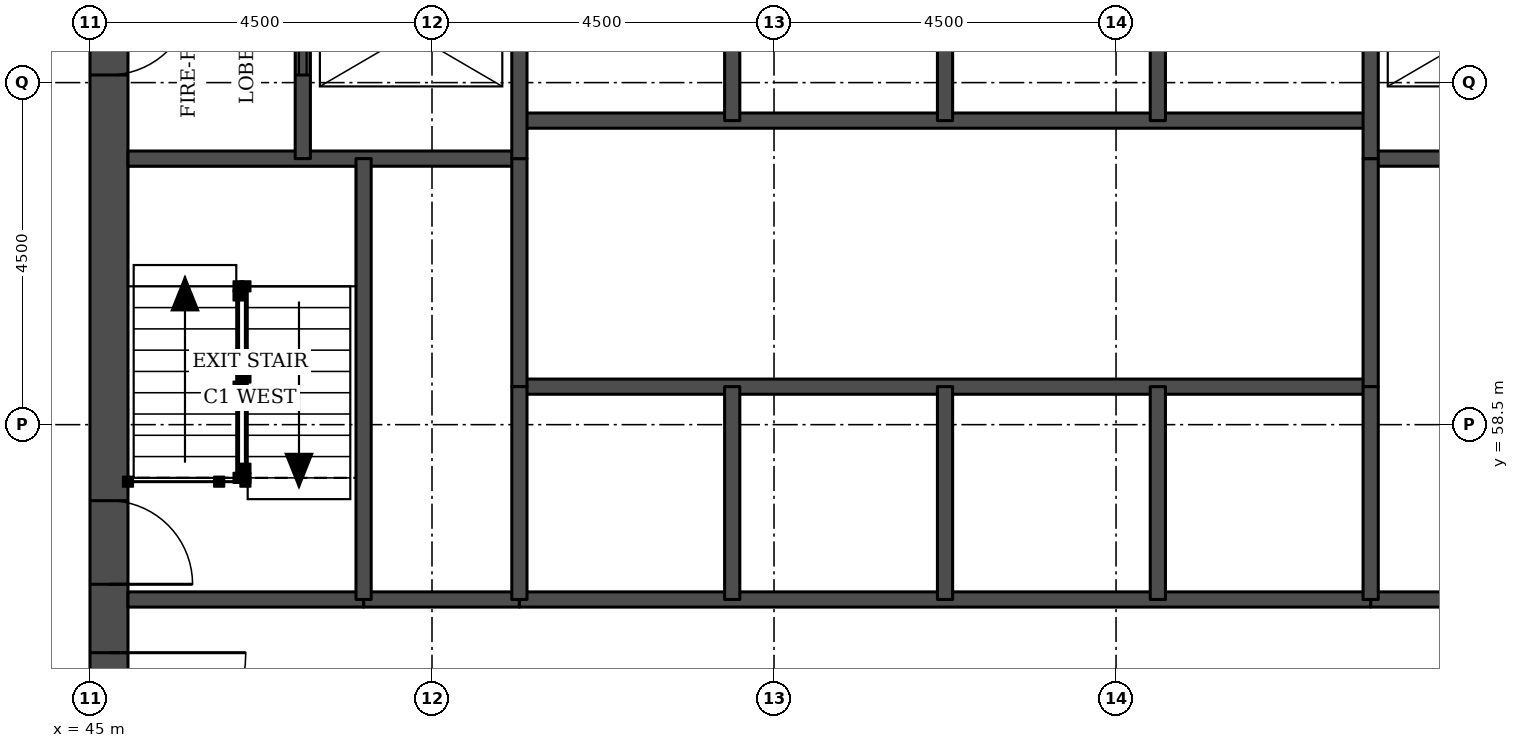
"""IFC4 building model, lengths in metres.
Left out: names, types, materials, properties, quantities, classifications, styles, units other than length and angle.
Written with IfcOpenShell. Run it as: python <this file> out.ifc"""

import sys

from ifc_helpers import new_model, si_unit, direction, frame, frame_2d, origin, place, context, subcontext, project, spatial, rectangle, extrude, element, fill, save


model = new_model("IFC4")
c1 = context("Model", 3, precision=1e-05, world=origin(), true_north=direction((0.0, 1.0)))
c2 = subcontext(c1, "Body", "Model", "MODEL_VIEW")
j1 = project(units=[si_unit("LENGTHUNIT", "METRE"), si_unit("PLANEANGLEUNIT", "RADIAN")], contexts=[c1])
p1 = place(None, origin())
s1 = spatial("IfcSite", under=j1, at=p1, CompositionType="ELEMENT")
p2 = place(p1, origin())
s2 = spatial("IfcBuilding", under=s1, at=p2, CompositionType="ELEMENT")
p3 = place(p2, frame((0.0, 0.0, 39.6)))
s3 = spatial("IfcBuildingStorey", under=s2, at=p3, CompositionType="ELEMENT", Elevation=39.6)
p4 = place(p3, frame((45.25, 49.5, 0.0), z_axis=(0.0, 0.0, 1.0), x_axis=(0.0, 1.0, 0.0)))
e1 = element("IfcWall", 1, at=p4, inside=s3, PredefinedType="SHEAR", context=c2, shape_type="SweptSolid", body=[
    extrude(rectangle(XDim=22.5, YDim=0.5, at=frame_2d((11.25, 0.0))), origin(), (0.0, 0.0, 1.0), 3.3),
])
p5 = place(p4, frame((4.2, 0.0, 0.0)))
e2 = element("IfcOpeningElement", 2, at=p5, cuts=e1, PredefinedType="OPENING", context=c2, shape_type="SweptSolid", body=[
    extrude(rectangle(XDim=1.8, YDim=2.1, at=frame_2d((0.9, 1.05))), frame((0.0, 0.26, 0.0), z_axis=(0.0, -1.0, 0.0), x_axis=(1.0, 0.0, 0.0)), (0.0, 0.0, 1.0), 0.52),
])
p6 = place(p4, frame((6.9, 0.0, 0.0)))
e3 = element("IfcOpeningElement", 3, at=p6, cuts=e1, PredefinedType="OPENING", context=c2, shape_type="SweptSolid", body=[
    extrude(rectangle(XDim=1.1, YDim=2.1, at=frame_2d((0.55, 1.05))), frame((0.0, 0.26, 0.0), z_axis=(0.0, -1.0, 0.0), x_axis=(1.0, 0.0, 0.0)), (0.0, 0.0, 1.0), 0.52),
])
p7 = place(p4, frame((13.6, 0.0, 0.0)))
e4 = element("IfcOpeningElement", 4, at=p7, cuts=e1, PredefinedType="OPENING", context=c2, shape_type="SweptSolid", body=[
    extrude(rectangle(XDim=1.1, YDim=2.1, at=frame_2d((0.55, 1.05))), frame((0.0, 0.26, 0.0), z_axis=(0.0, -1.0, 0.0), x_axis=(1.0, 0.0, 0.0)), (0.0, 0.0, 1.0), 0.52),
])
p8 = place(p4, frame((16.5, 0.0, 0.0)))
e5 = element("IfcOpeningElement", 5, at=p8, cuts=e1, PredefinedType="OPENING", context=c2, shape_type="SweptSolid", body=[
    extrude(rectangle(XDim=1.8, YDim=2.1, at=frame_2d((0.9, 1.05))), frame((0.0, 0.26, 0.0), z_axis=(0.0, -1.0, 0.0), x_axis=(1.0, 0.0, 0.0)), (0.0, 0.0, 1.0), 0.52),
])
for number, where, z_axis, x_axis in (
    (6, (48.6, 56.2, 0.0), (0.0, 0.0, 1.0), (1.0, 0.0, 0.0)),
    (7, (61.85, 56.2, 0.0), (0.0, 0.0, 1.0), (1.0, 0.0, 0.0)),
):
    element("IfcWall", number, at=place(p3, frame(where, z_axis=z_axis, x_axis=x_axis)), inside=s3, PredefinedType="SOLIDWALL", context=c2, shape_type="SweptSolid", body=[
        extrude(rectangle(XDim=2.05, YDim=0.2, at=frame_2d((1.025, 0.0))), origin(), (0.0, 0.0, 1.0), 3.08),
    ])
p9 = place(p3, frame((45.5, 56.2, 0.0), z_axis=(0.0, 0.0, 1.0), x_axis=(1.0, 0.0, 0.0)))
e8 = element("IfcWall", 8, at=p9, inside=s3, PredefinedType="SOLIDWALL", context=c2, shape_type="SweptSolid", body=[
    extrude(rectangle(XDim=3.1, YDim=0.2, at=frame_2d((1.55, 0.0))), origin(), (0.0, 0.0, 1.0), 3.08),
])
p10 = place(p3, frame((50.65, 56.2, 0.0), z_axis=(0.0, 0.0, 1.0), x_axis=(1.0, 0.0, 0.0)))
e9 = element("IfcWall", 9, at=p10, inside=s3, PredefinedType="SOLIDWALL", context=c2, shape_type="SweptSolid", body=[
    extrude(rectangle(XDim=11.2, YDim=0.2, at=frame_2d((5.6, 0.0))), origin(), (0.0, 0.0, 1.0), 3.08),
])
p11 = place(p3, frame((50.65, 59.0, 0.0), z_axis=(0.0, 0.0, 1.0), x_axis=(1.0, 0.0, 0.0)))
e10 = element("IfcWall", 10, at=p11, inside=s3, PredefinedType="SOLIDWALL", context=c2, shape_type="SweptSolid", body=[
    extrude(rectangle(XDim=11.2, YDim=0.2, at=frame_2d((5.6, 0.0))), origin(), (0.0, 0.0, 1.0), 3.3),
])
for number, where, z_axis, x_axis in (
    (11, (45.5, 62.0, 0.0), (0.0, 0.0, 1.0), (1.0, 0.0, 0.0)),
    (12, (61.85, 62.0, 0.0), (0.0, 0.0, 1.0), (1.0, 0.0, 0.0)),
):
    element("IfcWall", number, at=place(p3, frame(where, z_axis=z_axis, x_axis=x_axis)), inside=s3, PredefinedType="SOLIDWALL", context=c2, shape_type="SweptSolid", body=[
        extrude(rectangle(XDim=5.15, YDim=0.2, at=frame_2d((2.575, 0.0))), origin(), (0.0, 0.0, 1.0), 3.08),
    ])
p12 = place(p3, frame((50.65, 62.5, 0.0), z_axis=(0.0, 0.0, 1.0), x_axis=(1.0, 0.0, 0.0)))
e13 = element("IfcWall", 13, at=p12, inside=s3, PredefinedType="SOLIDWALL", context=c2, shape_type="SweptSolid", body=[
    extrude(rectangle(XDim=11.2, YDim=0.2, at=frame_2d((5.6, 0.0))), origin(), (0.0, 0.0, 1.0), 3.3),
])
p13 = place(p3, frame((47.8, 62.0, 0.0), z_axis=(0.0, 0.0, 1.0), x_axis=(0.0, 1.0, 0.0)))
e14 = element("IfcWall", 14, at=p13, inside=s3, PredefinedType="SOLIDWALL", context=c2, shape_type="SweptSolid", body=[
    extrude(rectangle(XDim=3.3, YDim=0.2, at=frame_2d((1.65, 0.0))), origin(), (0.0, 0.0, 1.0), 3.08),
])
p14 = place(p13, frame((1.1, 0.0, 0.0)))
e15 = element("IfcOpeningElement", 15, at=p14, cuts=e14, PredefinedType="OPENING", context=c2, shape_type="SweptSolid", body=[
    extrude(rectangle(XDim=1.1, YDim=2.1, at=frame_2d((0.55, 1.05))), frame((0.0, 0.11, 0.0), z_axis=(0.0, -1.0, 0.0), x_axis=(1.0, 0.0, 0.0)), (0.0, 0.0, 1.0), 0.22),
])
p15 = place(p3, frame((48.6, 56.2, 0.0), z_axis=(0.0, 0.0, 1.0), x_axis=(0.0, 1.0, 0.0)))
e16 = element("IfcWall", 16, at=p15, inside=s3, PredefinedType="SOLIDWALL", context=c2, shape_type="SweptSolid", body=[
    extrude(rectangle(XDim=5.8, YDim=0.2, at=frame_2d((2.9, 0.0))), origin(), (0.0, 0.0, 1.0), 3.08),
])
p16 = place(p3, frame((50.65, 59.0, 0.0), z_axis=(0.0, 0.0, 1.0), x_axis=(0.0, 1.0, 0.0)))
e17 = element("IfcWall", 17, at=p16, inside=s3, PredefinedType="SOLIDWALL", context=c2, shape_type="SweptSolid", body=[
    extrude(rectangle(XDim=3.0, YDim=0.2, at=frame_2d((1.5, 0.0))), origin(), (0.0, 0.0, 1.0), 3.3),
])
p17 = place(p3, frame((50.65, 56.2, 0.0), z_axis=(0.0, 0.0, 1.0), x_axis=(0.0, 1.0, 0.0)))
e18 = element("IfcWall", 18, at=p17, inside=s3, PredefinedType="SOLIDWALL", context=c2, shape_type="SweptSolid", body=[
    extrude(rectangle(XDim=2.8, YDim=0.2, at=frame_2d((1.4, 0.0))), origin(), (0.0, 0.0, 1.0), 3.08),
])
p18 = place(p3, frame((50.65, 62.0, 0.0), z_axis=(0.0, 0.0, 1.0), x_axis=(0.0, 1.0, 0.0)))
e19 = element("IfcWall", 19, at=p18, inside=s3, PredefinedType="SOLIDWALL", context=c2, shape_type="SweptSolid", body=[
    extrude(rectangle(XDim=3.3, YDim=0.2, at=frame_2d((1.65, 0.0))), origin(), (0.0, 0.0, 1.0), 3.08),
])
for number, where, z_axis, x_axis in (
    (20, (53.45, 56.2, 0.0), (0.0, 0.0, 1.0), (0.0, 1.0, 0.0)),
    (21, (53.45, 62.5, 0.0), (0.0, 0.0, 1.0), (0.0, 1.0, 0.0)),
    (22, (56.25, 56.2, 0.0), (0.0, 0.0, 1.0), (0.0, 1.0, 0.0)),
    (23, (56.25, 62.5, 0.0), (0.0, 0.0, 1.0), (0.0, 1.0, 0.0)),
    (24, (59.05, 56.2, 0.0), (0.0, 0.0, 1.0), (0.0, 1.0, 0.0)),
    (25, (59.05, 62.5, 0.0), (0.0, 0.0, 1.0), (0.0, 1.0, 0.0)),
):
    element("IfcWall", number, at=place(p3, frame(where, z_axis=z_axis, x_axis=x_axis)), inside=s3, PredefinedType="SOLIDWALL", context=c2, shape_type="SweptSolid", body=[
        extrude(rectangle(XDim=2.8, YDim=0.2, at=frame_2d((1.4, 0.0))), origin(), (0.0, 0.0, 1.0), 3.08),
    ])
p19 = place(p3, frame((61.85, 59.0, 0.0), z_axis=(0.0, 0.0, 1.0), x_axis=(0.0, 1.0, 0.0)))
e26 = element("IfcWall", 26, at=p19, inside=s3, PredefinedType="SOLIDWALL", context=c2, shape_type="SweptSolid", body=[
    extrude(rectangle(XDim=3.0, YDim=0.2, at=frame_2d((1.5, 0.0))), origin(), (0.0, 0.0, 1.0), 3.3),
])
p20 = place(p3, frame((61.85, 56.2, 0.0), z_axis=(0.0, 0.0, 1.0), x_axis=(0.0, 1.0, 0.0)))
e27 = element("IfcWall", 27, at=p20, inside=s3, PredefinedType="SOLIDWALL", context=c2, shape_type="SweptSolid", body=[
    extrude(rectangle(XDim=2.8, YDim=0.2, at=frame_2d((1.4, 0.0))), origin(), (0.0, 0.0, 1.0), 3.08),
])
p21 = place(p3, frame((61.85, 62.0, 0.0), z_axis=(0.0, 0.0, 1.0), x_axis=(0.0, 1.0, 0.0)))
e28 = element("IfcWall", 28, at=p21, inside=s3, PredefinedType="SOLIDWALL", context=c2, shape_type="SweptSolid", body=[
    extrude(rectangle(XDim=3.3, YDim=0.2, at=frame_2d((1.65, 0.0))), origin(), (0.0, 0.0, 1.0), 3.08),
])
p22 = place(p14, origin())
e29 = element("IfcDoor", 29, at=p22, inside=s3, OperationType="DOUBLE_DOOR_SLIDING", PredefinedType="DOOR", context=c2, shape_type="SweptSolid", body=[
    extrude(rectangle(XDim=1.1, YDim=2.1, at=frame_2d((0.55, 1.05))), frame((0.0, 0.025, 0.0), z_axis=(0.0, -1.0, 0.0), x_axis=(1.0, 0.0, 0.0)), (0.0, 0.0, 1.0), 0.05),
])
fill(e15, e29)
p23 = place(p5, frame((1.8, 0.0, 0.0), z_axis=(0.0, 0.0, 1.0), x_axis=(-1.0, 0.0, 0.0)))
e30 = element("IfcDoor", 30, at=p23, inside=s3, OperationType="SINGLE_SWING_LEFT", PredefinedType="DOOR", context=c2, shape_type="SweptSolid", body=[
    extrude(rectangle(XDim=1.8, YDim=2.1, at=frame_2d((0.9, 1.05))), frame((0.0, 0.025, 0.0), z_axis=(0.0, -1.0, 0.0), x_axis=(1.0, 0.0, 0.0)), (0.0, 0.0, 1.0), 0.05),
])
fill(e2, e30)
p24 = place(p6, frame((1.1, 0.0, 0.0), z_axis=(0.0, 0.0, 1.0), x_axis=(-1.0, 0.0, 0.0)))
e31 = element("IfcDoor", 31, at=p24, inside=s3, OperationType="SINGLE_SWING_RIGHT", PredefinedType="DOOR", context=c2, shape_type="SweptSolid", body=[
    extrude(rectangle(XDim=1.1, YDim=2.1, at=frame_2d((0.55, 1.05))), frame((0.0, 0.025, 0.0), z_axis=(0.0, -1.0, 0.0), x_axis=(1.0, 0.0, 0.0)), (0.0, 0.0, 1.0), 0.05),
])
fill(e3, e31)
p25 = place(p7, frame((1.1, 0.0, 0.0), z_axis=(0.0, 0.0, 1.0), x_axis=(-1.0, 0.0, 0.0)))
e32 = element("IfcDoor", 32, at=p25, inside=s3, OperationType="SINGLE_SWING_LEFT", PredefinedType="DOOR", context=c2, shape_type="SweptSolid", body=[
    extrude(rectangle(XDim=1.1, YDim=2.1, at=frame_2d((0.55, 1.05))), frame((0.0, 0.025, 0.0), z_axis=(0.0, -1.0, 0.0), x_axis=(1.0, 0.0, 0.0)), (0.0, 0.0, 1.0), 0.05),
])
fill(e4, e32)
save(model, sys.argv[1])
